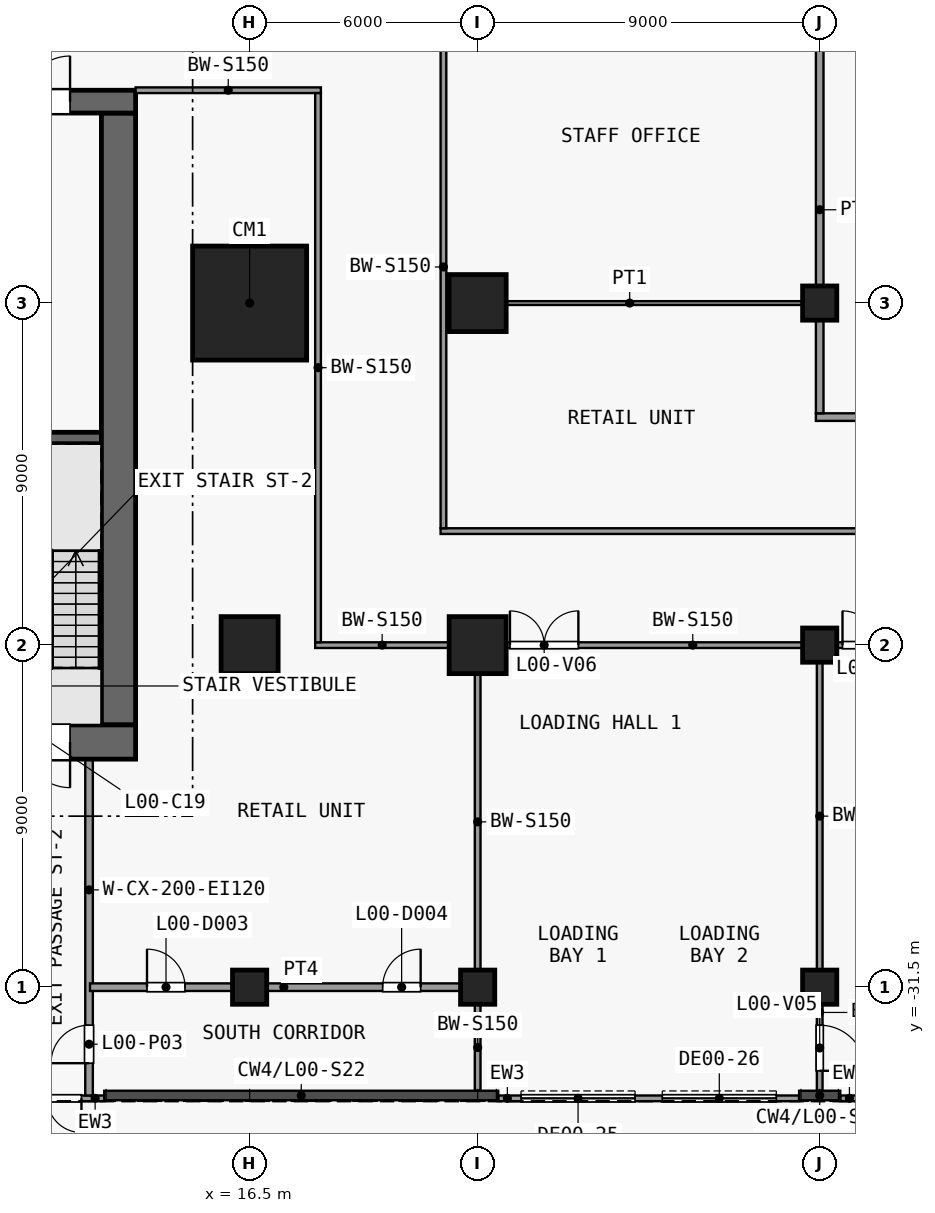
"""IFC4 building model, lengths in metres.
Left out: names, types, materials, properties, quantities, classifications, styles, units other than length and angle.
Written with IfcOpenShell. Run it as: python <this file> out.ifc"""

import sys

from ifc_helpers import new_model, si_unit, direction, frame, frame_2d, origin, origin_2d, place, context, subcontext, project, spatial, rectangle, extrude, element, fill, save


model = new_model("IFC4")
c1 = context("Model", 3, precision=1e-05, world=origin(), true_north=direction((0.0, 1.0)))
c2 = subcontext(c1, "Body", "Model", "MODEL_VIEW")
j1 = project(units=[si_unit("LENGTHUNIT", "METRE"), si_unit("PLANEANGLEUNIT", "RADIAN")], contexts=[c1])
p1 = place(None, origin())
s1 = spatial("IfcSite", under=j1, at=p1, CompositionType="ELEMENT")
p2 = place(p1, origin())
s2 = spatial("IfcBuilding", under=s1, at=p2, CompositionType="ELEMENT")
p3 = place(p2, origin())
s3 = spatial("IfcBuildingStorey", under=s2, at=p3, CompositionType="ELEMENT", Elevation=0.0)
p4 = place(p3, frame((16.5, -31.5, 0.0), z_axis=(0.0, 0.0, 1.0), x_axis=(1.0, 0.0, 0.0)))
e1 = element("IfcColumn", 1, at=p4, inside=s3, PredefinedType="COLUMN", context=c2, shape_type="SweptSolid", body=[
    extrude(rectangle(XDim=0.9, YDim=0.9, at=origin_2d()), origin(), (0.0, 0.0, 1.0), 8.0),
])
p5 = place(p3, frame((16.5, -22.5, 0.0), z_axis=(0.0, 0.0, 1.0), x_axis=(1.0, 0.0, 0.0)))
e2 = element("IfcColumn", 2, at=p5, inside=s3, PredefinedType="COLUMN", context=c2, shape_type="SweptSolid", body=[
    extrude(rectangle(XDim=1.5, YDim=1.5, at=origin_2d()), origin(), (0.0, 0.0, 1.0), 8.0),
])
p6 = place(p3, frame((16.5, -13.5, 0.0), z_axis=(0.0, 0.0, 1.0), x_axis=(1.0, 0.0, 0.0)))
e3 = element("IfcColumn", 3, at=p6, inside=s3, PredefinedType="COLUMN", context=c2, shape_type="SweptSolid", body=[
    extrude(rectangle(XDim=3.0, YDim=3.0, at=origin_2d()), origin(), (0.0, 0.0, 1.0), 8.0),
])
p7 = place(p3, frame((22.5, -31.5, 0.0), z_axis=(0.0, 0.0, 1.0), x_axis=(1.0, 0.0, 0.0)))
e4 = element("IfcColumn", 4, at=p7, inside=s3, PredefinedType="COLUMN", context=c2, shape_type="SweptSolid", body=[
    extrude(rectangle(XDim=0.9, YDim=0.9, at=origin_2d()), origin(), (0.0, 0.0, 1.0), 8.0),
])
for number, where, z_axis, x_axis in (
    (5, (22.5, -22.5, 0.0), (0.0, 0.0, 1.0), (1.0, 0.0, 0.0)),
    (6, (22.5, -13.5, 0.0), (0.0, 0.0, 1.0), (1.0, 0.0, 0.0)),
):
    element("IfcColumn", number, at=place(p3, frame(where, z_axis=z_axis, x_axis=x_axis)), inside=s3, PredefinedType="COLUMN", context=c2, shape_type="SweptSolid", body=[
        extrude(rectangle(XDim=1.5, YDim=1.5, at=origin_2d()), origin(), (0.0, 0.0, 1.0), 8.0),
    ])
for number, where, z_axis, x_axis in (
    (7, (31.5, -31.5, 0.0), (0.0, 0.0, 1.0), (1.0, 0.0, 0.0)),
    (8, (31.5, -22.5, 0.0), (0.0, 0.0, 1.0), (1.0, 0.0, 0.0)),
    (9, (31.5, -13.5, 0.0), (0.0, 0.0, 1.0), (1.0, 0.0, 0.0)),
):
    element("IfcColumn", number, at=place(p3, frame(where, z_axis=z_axis, x_axis=x_axis)), inside=s3, PredefinedType="COLUMN", context=c2, shape_type="SweptSolid", body=[
        extrude(rectangle(XDim=0.9, YDim=0.9, at=origin_2d()), origin(), (0.0, 0.0, 1.0), 8.0),
    ])
p8 = place(p3, frame((13.5, -25.05, 0.0), z_axis=(0.0, 0.0, 1.0), x_axis=(-1.0, 0.0, 0.0)))
e10 = element("IfcWall", 10, at=p8, inside=s3, PredefinedType="SHEAR", context=c2, shape_type="SweptSolid", body=[
    extrude(rectangle(XDim=27.0, YDim=0.9, at=frame_2d((13.5, 0.0))), origin(), (0.0, 0.0, 1.0), 7.65),
])
p9 = place(p8, frame((24.075, 0.0, 0.0)))
e11 = element("IfcOpeningElement", 11, at=p9, cuts=e10, PredefinedType="OPENING", context=c2, shape_type="SweptSolid", body=[
    extrude(rectangle(XDim=1.2, YDim=2.1, at=frame_2d((0.6, 1.05))), frame((0.0, 0.46, 0.0), z_axis=(0.0, -1.0, 0.0), x_axis=(1.0, 0.0, 0.0)), (0.0, 0.0, 1.0), 0.92),
])
p10 = place(p8, frame((1.725, 0.0, 0.0)))
e12 = element("IfcOpeningElement", 12, at=p10, cuts=e10, PredefinedType="OPENING", context=c2, shape_type="SweptSolid", body=[
    extrude(rectangle(XDim=1.2, YDim=2.1, at=frame_2d((0.6, 1.05))), frame((0.0, 0.46, 0.0), z_axis=(0.0, -1.0, 0.0), x_axis=(1.0, 0.0, 0.0)), (0.0, 0.0, 1.0), 0.92),
])
p11 = place(p3, frame((-13.5, -8.2, 0.0), z_axis=(0.0, 0.0, 1.0), x_axis=(1.0, 0.0, 0.0)))
e13 = element("IfcWall", 13, at=p11, inside=s3, PredefinedType="SHEAR", context=c2, shape_type="SweptSolid", body=[
    extrude(rectangle(XDim=27.0, YDim=0.6, at=frame_2d((13.5, 0.0))), origin(), (0.0, 0.0, 1.0), 7.65),
])
p12 = place(p11, frame((7.8, 0.0, 0.0)))
e14 = element("IfcOpeningElement", 14, at=p12, cuts=e13, PredefinedType="OPENING", context=c2, shape_type="SweptSolid", body=[
    extrude(rectangle(XDim=1.8, YDim=2.1, at=frame_2d((0.9, 1.05))), frame((0.0, 0.31, 0.0), z_axis=(0.0, -1.0, 0.0), x_axis=(1.0, 0.0, 0.0)), (0.0, 0.0, 1.0), 0.62),
])
p13 = place(p11, frame((17.4, 0.0, 0.0)))
e15 = element("IfcOpeningElement", 15, at=p13, cuts=e13, PredefinedType="OPENING", context=c2, shape_type="SweptSolid", body=[
    extrude(rectangle(XDim=1.8, YDim=2.1, at=frame_2d((0.9, 1.05))), frame((0.0, 0.31, 0.0), z_axis=(0.0, -1.0, 0.0), x_axis=(1.0, 0.0, 0.0)), (0.0, 0.0, 1.0), 0.62),
])
p14 = place(p11, frame((2.725, 0.0, 0.0)))
e16 = element("IfcOpeningElement", 16, at=p14, cuts=e13, PredefinedType="OPENING", context=c2, shape_type="SweptSolid", body=[
    extrude(rectangle(XDim=0.9, YDim=2.1, at=frame_2d((0.45, 1.05))), frame((0.0, 0.31, 0.0), z_axis=(0.0, -1.0, 0.0), x_axis=(1.0, 0.0, 0.0)), (0.0, 0.0, 1.0), 0.62),
])
p15 = place(p11, frame((24.075, 0.0, 0.0)))
e17 = element("IfcOpeningElement", 17, at=p15, cuts=e13, PredefinedType="OPENING", context=c2, shape_type="SweptSolid", body=[
    extrude(rectangle(XDim=1.2, YDim=2.1, at=frame_2d((0.6, 1.05))), frame((0.0, 0.31, 0.0), z_axis=(0.0, -1.0, 0.0), x_axis=(1.0, 0.0, 0.0)), (0.0, 0.0, 1.0), 0.62),
])
p16 = place(p3, frame((13.05, -24.6, 0.0), z_axis=(0.0, 0.0, 1.0), x_axis=(0.0, 1.0, 0.0)))
e18 = element("IfcWall", 18, at=p16, inside=s3, PredefinedType="SHEAR", context=c2, shape_type="SweptSolid", body=[
    extrude(rectangle(XDim=16.1, YDim=0.9, at=frame_2d((8.05, 0.0))), origin(), (0.0, 0.0, 1.0), 7.65),
])
p17 = place(p3, frame((9.5, -17.05, 0.0), z_axis=(0.0, 0.0, 1.0), x_axis=(1.0, 0.0, 0.0)))
e19 = element("IfcWall", 19, at=p17, inside=s3, PredefinedType="SHEAR", context=c2, shape_type="SweptSolid", body=[
    extrude(rectangle(XDim=3.1, YDim=0.3, at=frame_2d((1.55, 0.0))), origin(), (0.0, 0.0, 1.0), 7.65),
])
p18 = place(p3, frame((12.275, -34.35, 0.0), z_axis=(0.0, 0.0, 1.0), x_axis=(0.0, 1.0, 0.0)))
e20 = element("IfcWall", 20, at=p18, inside=s3, PredefinedType="PARTITIONING", context=c2, shape_type="SweptSolid", body=[
    extrude(rectangle(XDim=8.85, YDim=0.2, at=frame_2d((4.425, 0.0))), origin(), (0.0, 0.0, 1.0), 7.65),
])
p19 = place(p18, frame((0.85, 0.0, 0.0)))
e21 = element("IfcOpeningElement", 21, at=p19, cuts=e20, PredefinedType="OPENING", context=c2, shape_type="SweptSolid", body=[
    extrude(rectangle(XDim=1.0, YDim=2.1, at=frame_2d((0.5, 1.05))), frame((0.0, 0.11, 0.0), z_axis=(0.0, -1.0, 0.0), x_axis=(1.0, 0.0, 0.0)), (0.0, 0.0, 1.0), 0.22),
])
p20 = place(p3, frame((18.225, -22.5, 0.0), z_axis=(0.0, 0.0, 1.0), x_axis=(1.0, 0.0, 0.0)))
e22 = element("IfcWall", 22, at=p20, inside=s3, PredefinedType="PARTITIONING", context=c2, shape_type="SweptSolid", body=[
    extrude(rectangle(XDim=3.525, YDim=0.15, at=frame_2d((1.762, 0.0))), origin(), (0.0, 0.0, 1.0), 7.65),
])
p21 = place(p3, frame((23.25, -22.5, 0.0), z_axis=(0.0, 0.0, 1.0), x_axis=(1.0, 0.0, 0.0)))
e23 = element("IfcWall", 23, at=p21, inside=s3, PredefinedType="PARTITIONING", context=c2, shape_type="SweptSolid", body=[
    extrude(rectangle(XDim=7.8, YDim=0.15, at=frame_2d((3.9, 0.0))), origin(), (0.0, 0.0, 1.0), 7.65),
])
p22 = place(p21, frame((0.1, 0.0, 0.0)))
e24 = element("IfcOpeningElement", 24, at=p22, cuts=e23, PredefinedType="OPENING", context=c2, shape_type="SweptSolid", body=[
    extrude(rectangle(XDim=1.8, YDim=2.1, at=frame_2d((0.9, 1.05))), frame((0.0, 0.085, 0.0), z_axis=(0.0, -1.0, 0.0), x_axis=(1.0, 0.0, 0.0)), (0.0, 0.0, 1.0), 0.17),
])
p23 = place(p3, frame((31.95, -22.5, 0.0), z_axis=(0.0, 0.0, 1.0), x_axis=(1.0, 0.0, 0.0)))
e25 = element("IfcWall", 25, at=p23, inside=s3, PredefinedType="PARTITIONING", context=c2, shape_type="SweptSolid", body=[
    extrude(rectangle(XDim=8.1, YDim=0.15, at=frame_2d((4.05, 0.0))), origin(), (0.0, 0.0, 1.0), 7.65),
])
p24 = place(p23, frame((0.15, 0.0, 0.0)))
e26 = element("IfcOpeningElement", 26, at=p24, cuts=e25, PredefinedType="OPENING", context=c2, shape_type="SweptSolid", body=[
    extrude(rectangle(XDim=1.8, YDim=2.1, at=frame_2d((0.9, 1.05))), frame((0.0, 0.085, 0.0), z_axis=(0.0, -1.0, 0.0), x_axis=(1.0, 0.0, 0.0)), (0.0, 0.0, 1.0), 0.17),
])
p25 = place(p3, frame((21.525, -19.5, 0.0), z_axis=(0.0, 0.0, 1.0), x_axis=(1.0, 0.0, 0.0)))
e27 = element("IfcWall", 27, at=p25, inside=s3, PredefinedType="PARTITIONING", context=c2, shape_type="SweptSolid", body=[
    extrude(rectangle(XDim=28.05, YDim=0.15, at=frame_2d((14.025, 0.0))), origin(), (0.0, 0.0, 1.0), 7.65),
])
p26 = place(p3, frame((13.5, -7.9, 0.0), z_axis=(0.0, 0.0, 1.0), x_axis=(1.0, 0.0, 0.0)))
e28 = element("IfcWall", 28, at=p26, inside=s3, PredefinedType="PARTITIONING", context=c2, shape_type="SweptSolid", body=[
    extrude(rectangle(XDim=4.875, YDim=0.15, at=frame_2d((2.438, 0.0))), origin(), (0.0, 0.0, 1.0), 7.65),
])
p27 = place(p3, frame((18.3, -22.425, 0.0), z_axis=(0.0, 0.0, 1.0), x_axis=(0.0, 1.0, 0.0)))
e29 = element("IfcWall", 29, at=p27, inside=s3, PredefinedType="PARTITIONING", context=c2, shape_type="SweptSolid", body=[
    extrude(rectangle(XDim=14.45, YDim=0.15, at=frame_2d((7.225, 0.0))), origin(), (0.0, 0.0, 1.0), 7.65),
])
p28 = place(p3, frame((21.6, -19.425, 0.0), z_axis=(0.0, 0.0, 1.0), x_axis=(0.0, 1.0, 0.0)))
e30 = element("IfcWall", 30, at=p28, inside=s3, PredefinedType="PARTITIONING", context=c2, shape_type="SweptSolid", body=[
    extrude(rectangle(XDim=13.75, YDim=0.15, at=frame_2d((6.875, 0.0))), origin(), (0.0, 0.0, 1.0), 7.65),
])
p29 = place(p3, frame((22.5, -34.225, 0.0), z_axis=(0.0, 0.0, 1.0), x_axis=(0.0, 1.0, 0.0)))
e31 = element("IfcWall", 31, at=p29, inside=s3, PredefinedType="PARTITIONING", context=c2, shape_type="SweptSolid", body=[
    extrude(rectangle(XDim=2.275, YDim=0.15, at=frame_2d((1.138, 0.0))), origin(), (0.0, 0.0, 1.0), 7.65),
])
p30 = place(p3, frame((22.5, -31.05, 0.0), z_axis=(0.0, 0.0, 1.0), x_axis=(0.0, 1.0, 0.0)))
e32 = element("IfcWall", 32, at=p30, inside=s3, PredefinedType="PARTITIONING", context=c2, shape_type="SweptSolid", body=[
    extrude(rectangle(XDim=7.8, YDim=0.15, at=frame_2d((3.9, 0.0))), origin(), (0.0, 0.0, 1.0), 7.65),
])
p31 = place(p3, frame((31.5, -31.95, 0.0), z_axis=(0.0, 0.0, 1.0), x_axis=(0.0, -1.0, 0.0)))
e33 = element("IfcWall", 33, at=p31, inside=s3, PredefinedType="PARTITIONING", context=c2, shape_type="SweptSolid", body=[
    extrude(rectangle(XDim=2.275, YDim=0.15, at=frame_2d((1.138, 0.0))), origin(), (0.0, 0.0, 1.0), 7.65),
])
p32 = place(p31, frame((0.55, 0.0, 0.0)))
e34 = element("IfcOpeningElement", 34, at=p32, cuts=e33, PredefinedType="OPENING", context=c2, shape_type="SweptSolid", body=[
    extrude(rectangle(XDim=1.2, YDim=2.1, at=frame_2d((0.6, 1.05))), frame((0.0, 0.085, 0.0), z_axis=(0.0, -1.0, 0.0), x_axis=(1.0, 0.0, 0.0)), (0.0, 0.0, 1.0), 0.17),
])
p33 = place(p3, frame((31.5, -31.05, 0.0), z_axis=(0.0, 0.0, 1.0), x_axis=(0.0, 1.0, 0.0)))
e35 = element("IfcWall", 35, at=p33, inside=s3, PredefinedType="PARTITIONING", context=c2, shape_type="SweptSolid", body=[
    extrude(rectangle(XDim=8.1, YDim=0.15, at=frame_2d((4.05, 0.0))), origin(), (0.0, 0.0, 1.0), 7.65),
])
p34 = place(p3, frame((12.675, -34.425, 0.0), z_axis=(0.0, 0.0, 1.0), x_axis=(-1.0, 0.0, 0.0)))
e36 = element("IfcWall", 36, at=p34, inside=s3, PredefinedType="SOLIDWALL", context=c2, shape_type="SweptSolid", body=[
    extrude(rectangle(XDim=3.0, YDim=0.15, at=frame_2d((1.5, 0.0))), origin(), (0.0, 0.0, 1.0), 7.65),
])
p35 = place(p34, frame((0.6, 0.0, 0.0)))
e37 = element("IfcOpeningElement", 37, at=p35, cuts=e36, PredefinedType="OPENING", context=c2, shape_type="SweptSolid", body=[
    extrude(rectangle(XDim=1.8, YDim=2.1, at=frame_2d((0.9, 1.05))), frame((0.0, 0.085, 0.0), z_axis=(0.0, -1.0, 0.0), x_axis=(1.0, 0.0, 0.0)), (0.0, 0.0, 1.0), 0.17),
])
p36 = place(p3, frame((30.958, -34.425, 0.0), z_axis=(0.0, 0.0, 1.0), x_axis=(-1.0, 0.0, 0.0)))
e38 = element("IfcWall", 38, at=p36, inside=s3, PredefinedType="SOLIDWALL", context=c2, shape_type="SweptSolid", body=[
    extrude(rectangle(XDim=7.917, YDim=0.15, at=frame_2d((3.958, 0.0))), origin(), (0.0, 0.0, 1.0), 7.65),
])
p37 = place(p36, frame((4.317, 0.0, 0.0)))
e39 = element("IfcOpeningElement", 39, at=p37, cuts=e38, PredefinedType="OPENING", context=c2, shape_type="SweptSolid", body=[
    extrude(rectangle(XDim=3.0, YDim=4.3, at=frame_2d((1.5, 2.15))), frame((0.0, 0.085, 0.0), z_axis=(0.0, -1.0, 0.0), x_axis=(1.0, 0.0, 0.0)), (0.0, 0.0, 1.0), 0.17),
])
p38 = place(p36, frame((0.6, 0.0, 0.0)))
e40 = element("IfcOpeningElement", 40, at=p38, cuts=e38, PredefinedType="OPENING", context=c2, shape_type="SweptSolid", body=[
    extrude(rectangle(XDim=3.0, YDim=4.3, at=frame_2d((1.5, 2.15))), frame((0.0, 0.085, 0.0), z_axis=(0.0, -1.0, 0.0), x_axis=(1.0, 0.0, 0.0)), (0.0, 0.0, 1.0), 0.17),
])
p39 = place(p3, frame((39.958, -34.425, 0.0), z_axis=(0.0, 0.0, 1.0), x_axis=(-1.0, 0.0, 0.0)))
e41 = element("IfcWall", 41, at=p39, inside=s3, PredefinedType="SOLIDWALL", context=c2, shape_type="SweptSolid", body=[
    extrude(rectangle(XDim=7.917, YDim=0.15, at=frame_2d((3.958, 0.0))), origin(), (0.0, 0.0, 1.0), 7.65),
])
p40 = place(p39, frame((4.317, 0.0, 0.0)))
e42 = element("IfcOpeningElement", 42, at=p40, cuts=e41, PredefinedType="OPENING", context=c2, shape_type="SweptSolid", body=[
    extrude(rectangle(XDim=3.0, YDim=4.3, at=frame_2d((1.5, 2.15))), frame((0.0, 0.085, 0.0), z_axis=(0.0, -1.0, 0.0), x_axis=(1.0, 0.0, 0.0)), (0.0, 0.0, 1.0), 0.17),
])
p41 = place(p39, frame((0.6, 0.0, 0.0)))
e43 = element("IfcOpeningElement", 43, at=p41, cuts=e41, PredefinedType="OPENING", context=c2, shape_type="SweptSolid", body=[
    extrude(rectangle(XDim=3.0, YDim=4.3, at=frame_2d((1.5, 2.15))), frame((0.0, 0.085, 0.0), z_axis=(0.0, -1.0, 0.0), x_axis=(1.0, 0.0, 0.0)), (0.0, 0.0, 1.0), 0.17),
])
p42 = place(p3, frame((12.3, -31.5, 0.0), z_axis=(0.0, 0.0, 1.0), x_axis=(1.0, 0.0, 0.0)))
e44 = element("IfcWall", 44, at=p42, inside=s3, PredefinedType="PARTITIONING", context=c2, shape_type="SweptSolid", body=[
    extrude(rectangle(XDim=10.2, YDim=0.2, at=frame_2d((5.1, 0.0))), origin(), (0.0, 0.0, 1.0), 7.65),
])
p43 = place(p42, frame((1.5, 0.0, 0.0)))
e45 = element("IfcOpeningElement", 45, at=p43, cuts=e44, PredefinedType="OPENING", context=c2, shape_type="SweptSolid", body=[
    extrude(rectangle(XDim=1.0, YDim=2.1, at=frame_2d((0.5, 1.05))), frame((0.0, 0.11, 0.0), z_axis=(0.0, -1.0, 0.0), x_axis=(1.0, 0.0, 0.0)), (0.0, 0.0, 1.0), 0.22),
])
p44 = place(p42, frame((7.7, 0.0, 0.0)))
e46 = element("IfcOpeningElement", 46, at=p44, cuts=e44, PredefinedType="OPENING", context=c2, shape_type="SweptSolid", body=[
    extrude(rectangle(XDim=1.0, YDim=2.1, at=frame_2d((0.5, 1.05))), frame((0.0, 0.11, 0.0), z_axis=(0.0, -1.0, 0.0), x_axis=(1.0, 0.0, 0.0)), (0.0, 0.0, 1.0), 0.22),
])
p45 = place(p3, frame((31.4, -16.5, 0.0), z_axis=(0.0, 0.0, 1.0), x_axis=(1.0, 0.0, 0.0)))
e47 = element("IfcWall", 47, at=p45, inside=s3, PredefinedType="PARTITIONING", context=c2, shape_type="SweptSolid", body=[
    extrude(rectangle(XDim=18.1, YDim=0.2, at=frame_2d((9.05, 0.0))), origin(), (0.0, 0.0, 1.0), 7.65),
])
p46 = place(p45, frame((3.2, 0.0, 0.0)))
e48 = element("IfcOpeningElement", 48, at=p46, cuts=e47, PredefinedType="OPENING", context=c2, shape_type="SweptSolid", body=[
    extrude(rectangle(XDim=1.0, YDim=2.1, at=frame_2d((0.5, 1.05))), frame((0.0, 0.11, 0.0), z_axis=(0.0, -1.0, 0.0), x_axis=(1.0, 0.0, 0.0)), (0.0, 0.0, 1.0), 0.22),
])
p47 = place(p45, frame((14.0, 0.0, 0.0)))
e49 = element("IfcOpeningElement", 49, at=p47, cuts=e47, PredefinedType="OPENING", context=c2, shape_type="SweptSolid", body=[
    extrude(rectangle(XDim=1.0, YDim=2.1, at=frame_2d((0.5, 1.05))), frame((0.0, 0.11, 0.0), z_axis=(0.0, -1.0, 0.0), x_axis=(1.0, 0.0, 0.0)), (0.0, 0.0, 1.0), 0.22),
])
p48 = place(p3, frame((21.6, -13.5, 0.0), z_axis=(0.0, 0.0, 1.0), x_axis=(1.0, 0.0, 0.0)))
e50 = element("IfcWall", 50, at=p48, inside=s3, PredefinedType="PARTITIONING", context=c2, shape_type="SweptSolid", body=[
    extrude(rectangle(XDim=9.8, YDim=0.1, at=frame_2d((4.9, 0.0))), origin(), (0.0, 0.0, 1.0), 7.65),
])
p49 = place(p3, frame((31.5, -16.4, 0.0), z_axis=(0.0, 0.0, 1.0), x_axis=(0.0, 1.0, 0.0)))
e51 = element("IfcWall", 51, at=p49, inside=s3, PredefinedType="PARTITIONING", context=c2, shape_type="SweptSolid", body=[
    extrude(rectangle(XDim=10.71, YDim=0.2, at=frame_2d((5.355, 0.0))), origin(), (0.0, 0.0, 1.0), 7.65),
])
p50 = place(p10, origin())
e52 = element("IfcDoor", 52, at=p50, inside=s3, OperationType="SINGLE_SWING_LEFT", PredefinedType="DOOR", context=c2, shape_type="SweptSolid", body=[
    extrude(rectangle(XDim=1.2, YDim=2.1, at=frame_2d((0.6, 1.05))), frame((0.0, 0.025, 0.0), z_axis=(0.0, -1.0, 0.0), x_axis=(1.0, 0.0, 0.0)), (0.0, 0.0, 1.0), 0.05),
])
fill(e12, e52)
p51 = place(p15, origin())
e53 = element("IfcDoor", 53, at=p51, inside=s3, OperationType="SINGLE_SWING_RIGHT", PredefinedType="DOOR", context=c2, shape_type="SweptSolid", body=[
    extrude(rectangle(XDim=1.2, YDim=2.1, at=frame_2d((0.6, 1.05))), frame((0.0, 0.025, 0.0), z_axis=(0.0, -1.0, 0.0), x_axis=(1.0, 0.0, 0.0)), (0.0, 0.0, 1.0), 0.05),
])
fill(e17, e53)
p52 = place(p19, origin())
e54 = element("IfcDoor", 54, at=p52, inside=s3, OperationType="SINGLE_SWING_LEFT", PredefinedType="DOOR", context=c2, shape_type="SweptSolid", body=[
    extrude(rectangle(XDim=1.0, YDim=2.1, at=frame_2d((0.5, 1.05))), frame((0.0, 0.025, 0.0), z_axis=(0.0, -1.0, 0.0), x_axis=(1.0, 0.0, 0.0)), (0.0, 0.0, 1.0), 0.05),
])
fill(e21, e54)
p53 = place(p32, origin())
e55 = element("IfcDoor", 55, at=p53, inside=s3, OperationType="SINGLE_SWING_RIGHT", PredefinedType="DOOR", context=c2, shape_type="SweptSolid", body=[
    extrude(rectangle(XDim=1.2, YDim=2.1, at=frame_2d((0.6, 1.05))), frame((0.0, 0.025, 0.0), z_axis=(0.0, -1.0, 0.0), x_axis=(1.0, 0.0, 0.0)), (0.0, 0.0, 1.0), 0.05),
])
fill(e34, e55)
p54 = place(p22, origin())
e56 = element("IfcDoor", 56, at=p54, inside=s3, OperationType="DOUBLE_DOOR_SINGLE_SWING", PredefinedType="DOOR", context=c2, shape_type="SweptSolid", body=[
    extrude(rectangle(XDim=1.8, YDim=2.1, at=frame_2d((0.9, 1.05))), frame((0.0, 0.025, 0.0), z_axis=(0.0, -1.0, 0.0), x_axis=(1.0, 0.0, 0.0)), (0.0, 0.0, 1.0), 0.05),
])
fill(e24, e56)
p55 = place(p24, origin())
e57 = element("IfcDoor", 57, at=p55, inside=s3, OperationType="DOUBLE_DOOR_SINGLE_SWING", PredefinedType="DOOR", context=c2, shape_type="SweptSolid", body=[
    extrude(rectangle(XDim=1.8, YDim=2.1, at=frame_2d((0.9, 1.05))), frame((0.0, 0.025, 0.0), z_axis=(0.0, -1.0, 0.0), x_axis=(1.0, 0.0, 0.0)), (0.0, 0.0, 1.0), 0.05),
])
fill(e26, e57)
p56 = place(p35, origin())
e58 = element("IfcDoor", 58, at=p56, inside=s3, OperationType="DOUBLE_DOOR_SINGLE_SWING", PredefinedType="DOOR", context=c2, shape_type="SweptSolid", body=[
    extrude(rectangle(XDim=1.8, YDim=2.1, at=frame_2d((0.9, 1.05))), frame((0.0, 0.025, 0.0), z_axis=(0.0, -1.0, 0.0), x_axis=(1.0, 0.0, 0.0)), (0.0, 0.0, 1.0), 0.05),
])
fill(e37, e58)
p57 = place(p37, origin())
e59 = element("IfcDoor", 59, at=p57, inside=s3, OperationType="ROLLINGUP", PredefinedType="DOOR", context=c2, shape_type="SweptSolid", body=[
    extrude(rectangle(XDim=3.0, YDim=4.3, at=frame_2d((1.5, 2.15))), frame((0.0, 0.025, 0.0), z_axis=(0.0, -1.0, 0.0), x_axis=(1.0, 0.0, 0.0)), (0.0, 0.0, 1.0), 0.05),
])
fill(e39, e59)
p58 = place(p38, origin())
e60 = element("IfcDoor", 60, at=p58, inside=s3, OperationType="ROLLINGUP", PredefinedType="DOOR", context=c2, shape_type="SweptSolid", body=[
    extrude(rectangle(XDim=3.0, YDim=4.3, at=frame_2d((1.5, 2.15))), frame((0.0, 0.025, 0.0), z_axis=(0.0, -1.0, 0.0), x_axis=(1.0, 0.0, 0.0)), (0.0, 0.0, 1.0), 0.05),
])
fill(e40, e60)
p59 = place(p43, origin())
e61 = element("IfcDoor", 61, at=p59, inside=s3, OperationType="SINGLE_SWING_RIGHT", PredefinedType="DOOR", context=c2, shape_type="SweptSolid", body=[
    extrude(rectangle(XDim=1.0, YDim=2.1, at=frame_2d((0.5, 1.05))), frame((0.0, 0.025, 0.0), z_axis=(0.0, -1.0, 0.0), x_axis=(1.0, 0.0, 0.0)), (0.0, 0.0, 1.0), 0.05),
])
fill(e45, e61)
p60 = place(p44, origin())
e62 = element("IfcDoor", 62, at=p60, inside=s3, OperationType="SINGLE_SWING_LEFT", PredefinedType="DOOR", context=c2, shape_type="SweptSolid", body=[
    extrude(rectangle(XDim=1.0, YDim=2.1, at=frame_2d((0.5, 1.05))), frame((0.0, 0.025, 0.0), z_axis=(0.0, -1.0, 0.0), x_axis=(1.0, 0.0, 0.0)), (0.0, 0.0, 1.0), 0.05),
])
fill(e46, e62)
save(model, sys.argv[1])
